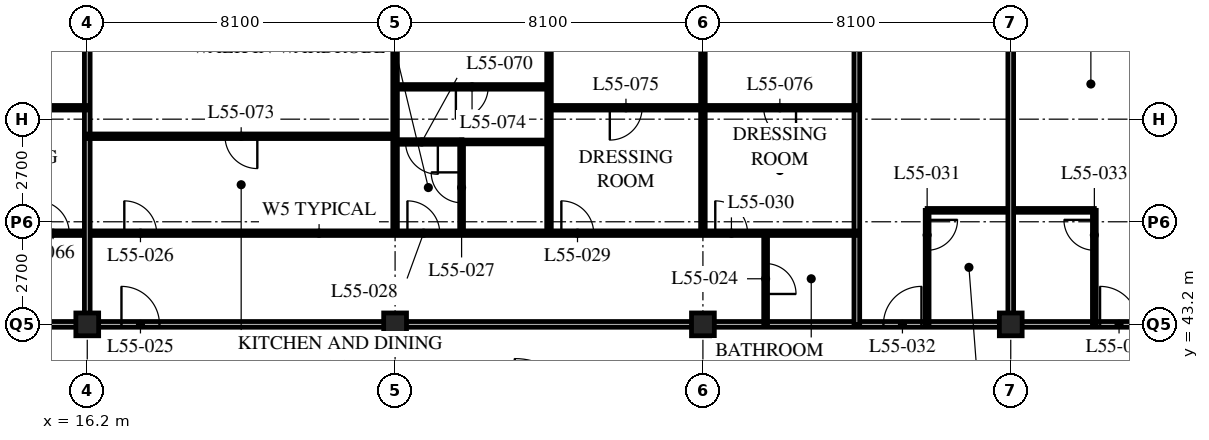
"""IFC4 building model, lengths in metres.
Left out: names, types, materials, properties, quantities, classifications, styles, units other than length and angle.
Written with IfcOpenShell. Run it as: python <this file> out.ifc"""

import sys

from ifc_helpers import new_model, si_unit, direction, frame, frame_2d, origin, origin_2d, place, context, subcontext, project, spatial, rectangle, hollow_rectangle, extrude, element, fill, save


model = new_model("IFC4")
c1 = context("Model", 3, precision=1e-05, world=origin(), true_north=direction((0.0, 1.0)))
c2 = subcontext(c1, "Body", "Model", "MODEL_VIEW")
j1 = project(units=[si_unit("LENGTHUNIT", "METRE"), si_unit("PLANEANGLEUNIT", "RADIAN")], contexts=[c1])
p1 = place(None, origin())
s1 = spatial("IfcSite", under=j1, at=p1, CompositionType="ELEMENT")
p2 = place(p1, origin())
s2 = spatial("IfcBuilding", under=s1, at=p2, CompositionType="ELEMENT")
p3 = place(p2, frame((0.0, 0.0, 213.6)))
s3 = spatial("IfcBuildingStorey", under=s2, at=p3, CompositionType="ELEMENT", Elevation=213.6)
for number, where, z_axis, x_axis in (
    (1, (16.2, 43.2, 0.0), (0.0, 0.0, 1.0), (1.0, 0.0, 0.0)),
    (2, (24.3, 43.2, 0.0), (0.0, 0.0, 1.0), (1.0, 0.0, 0.0)),
    (3, (32.4, 43.2, 0.0), (0.0, 0.0, 1.0), (1.0, 0.0, 0.0)),
    (4, (40.5, 43.2, 0.0), (0.0, 0.0, 1.0), (1.0, 0.0, 0.0)),
):
    element("IfcColumn", number, at=place(p3, frame(where, z_axis=z_axis, x_axis=x_axis)), inside=s3, PredefinedType="COLUMN", context=c2, shape_type="SweptSolid", body=[
        extrude(hollow_rectangle(XDim=0.6, YDim=0.6, WallThickness=0.05, at=origin_2d()), origin(), (0.0, 0.0, 1.0), 3.6),
    ])
p4 = place(p3, frame((12.15, 43.2, 0.0), z_axis=(0.0, 0.0, 1.0), x_axis=(1.0, 0.0, 0.0)))
e5 = element("IfcWall", 5, at=p4, inside=s3, PredefinedType="PARTITIONING", context=c2, shape_type="SweptSolid", body=[
    extrude(rectangle(XDim=36.45, YDim=0.15, at=frame_2d((18.225, 0.0))), origin(), (0.0, 0.0, 1.0), 2.778),
])
p5 = place(p4, frame((4.95, 0.0, 0.0)))
e6 = element("IfcOpeningElement", 6, at=p5, cuts=e5, PredefinedType="OPENING", context=c2, shape_type="SweptSolid", body=[
    extrude(rectangle(XDim=1.0, YDim=2.1, at=frame_2d((0.5, 1.05))), frame((0.0, 0.085, 0.0), z_axis=(0.0, -1.0, 0.0), x_axis=(1.0, 0.0, 0.0)), (0.0, 0.0, 1.0), 0.17),
])
p6 = place(p4, frame((25.0, 0.0, 0.0)))
e7 = element("IfcOpeningElement", 7, at=p6, cuts=e5, PredefinedType="OPENING", context=c2, shape_type="SweptSolid", body=[
    extrude(rectangle(XDim=1.0, YDim=2.1, at=frame_2d((0.5, 1.05))), frame((0.0, 0.085, 0.0), z_axis=(0.0, -1.0, 0.0), x_axis=(1.0, 0.0, 0.0)), (0.0, 0.0, 1.0), 0.17),
])
p7 = place(p4, frame((30.7, 0.0, 0.0)))
e8 = element("IfcOpeningElement", 8, at=p7, cuts=e5, PredefinedType="OPENING", context=c2, shape_type="SweptSolid", body=[
    extrude(rectangle(XDim=1.0, YDim=2.1, at=frame_2d((0.5, 1.05))), frame((0.0, 0.085, 0.0), z_axis=(0.0, -1.0, 0.0), x_axis=(1.0, 0.0, 0.0)), (0.0, 0.0, 1.0), 0.17),
])
p8 = place(p4, frame((33.925, 0.0, 0.0)))
e9 = element("IfcOpeningElement", 9, at=p8, cuts=e5, PredefinedType="OPENING", context=c2, shape_type="SweptSolid", body=[
    extrude(rectangle(XDim=1.0, YDim=2.1, at=frame_2d((0.5, 1.05))), frame((0.0, 0.085, 0.0), z_axis=(0.0, -1.0, 0.0), x_axis=(1.0, 0.0, 0.0)), (0.0, 0.0, 1.0), 0.17),
])
p9 = place(p4, frame((1.525, 0.0, 0.0)))
e10 = element("IfcOpeningElement", 10, at=p9, cuts=e5, PredefinedType="OPENING", context=c2, shape_type="SweptSolid", body=[
    extrude(rectangle(XDim=1.0, YDim=2.1, at=frame_2d((0.5, 1.05))), frame((0.0, 0.085, 0.0), z_axis=(0.0, -1.0, 0.0), x_axis=(1.0, 0.0, 0.0)), (0.0, 0.0, 1.0), 0.17),
])
p10 = place(p3, frame((34.05, 43.2, 0.0), z_axis=(0.0, 0.0, 1.0), x_axis=(0.0, 1.0, 0.0)))
e11 = element("IfcWall", 11, at=p10, inside=s3, PredefinedType="PARTITIONING", context=c2, shape_type="SweptSolid", body=[
    extrude(rectangle(XDim=2.4, YDim=0.1, at=frame_2d((1.2, 0.0))), origin(), (0.0, 0.0, 1.0), 3.39),
])
p11 = place(p10, frame((0.8, 0.0, 0.0)))
e12 = element("IfcOpeningElement", 12, at=p11, cuts=e11, PredefinedType="OPENING", context=c2, shape_type="SweptSolid", body=[
    extrude(rectangle(XDim=0.8, YDim=2.1, at=frame_2d((0.4, 1.05))), frame((0.0, 0.06, 0.0), z_axis=(0.0, -1.0, 0.0), x_axis=(1.0, 0.0, 0.0)), (0.0, 0.0, 1.0), 0.12),
])
p12 = place(p3, frame((26.05, 45.6, 0.0), z_axis=(0.0, 0.0, 1.0), x_axis=(0.0, 1.0, 0.0)))
e13 = element("IfcWall", 13, at=p12, inside=s3, PredefinedType="PARTITIONING", context=c2, shape_type="SweptSolid", body=[
    extrude(rectangle(XDim=2.4, YDim=0.1, at=frame_2d((1.2, 0.0))), origin(), (0.0, 0.0, 1.0), 3.39),
])
p13 = place(p12, frame((0.8, 0.0, 0.0)))
e14 = element("IfcOpeningElement", 14, at=p13, cuts=e13, PredefinedType="OPENING", context=c2, shape_type="SweptSolid", body=[
    extrude(rectangle(XDim=0.8, YDim=2.1, at=frame_2d((0.4, 1.05))), frame((0.0, 0.06, 0.0), z_axis=(0.0, -1.0, 0.0), x_axis=(1.0, 0.0, 0.0)), (0.0, 0.0, 1.0), 0.12),
])
p14 = place(p3, frame((26.05, 48.0, 0.0), z_axis=(0.0, 0.0, 1.0), x_axis=(1.0, 0.0, 0.0)))
e15 = element("IfcWall", 15, at=p14, inside=s3, PredefinedType="PARTITIONING", context=c2, shape_type="SweptSolid", body=[
    extrude(rectangle(XDim=2.3, YDim=0.1, at=frame_2d((1.15, 0.0))), origin(), (0.0, 0.0, 1.0), 3.39),
])
p15 = place(p3, frame((24.3, 45.6, 0.0), z_axis=(0.0, 0.0, 1.0), x_axis=(0.0, 1.0, 0.0)))
e16 = element("IfcWall", 16, at=p15, inside=s3, PredefinedType="PARTITIONING", context=c2, shape_type="SweptSolid", body=[
    extrude(rectangle(XDim=13.5, YDim=0.12, at=frame_2d((6.75, 0.0))), origin(), (0.0, 0.0, 1.0), 2.778),
])
p16 = place(p3, frame((28.35, 45.6, 0.0), z_axis=(0.0, 0.0, 1.0), x_axis=(0.0, 1.0, 0.0)))
e17 = element("IfcWall", 17, at=p16, inside=s3, PredefinedType="PARTITIONING", context=c2, shape_type="SweptSolid", body=[
    extrude(rectangle(XDim=13.5, YDim=0.12, at=frame_2d((6.75, 0.0))), origin(), (0.0, 0.0, 1.0), 3.39),
])
p17 = place(p3, frame((32.4, 45.6, 0.0), z_axis=(0.0, 0.0, 1.0), x_axis=(0.0, 1.0, 0.0)))
e18 = element("IfcWall", 18, at=p17, inside=s3, PredefinedType="PARTITIONING", context=c2, shape_type="SweptSolid", body=[
    extrude(rectangle(XDim=13.5, YDim=0.12, at=frame_2d((6.75, 0.0))), origin(), (0.0, 0.0, 1.0), 2.778),
])
p18 = place(p3, frame((36.45, 43.2, 0.0), z_axis=(0.0, 0.0, 1.0), x_axis=(0.0, 1.0, 0.0)))
e19 = element("IfcWall", 19, at=p18, inside=s3, PredefinedType="PARTITIONING", context=c2, shape_type="SweptSolid", body=[
    extrude(rectangle(XDim=15.9, YDim=0.15, at=frame_2d((7.95, 0.0))), origin(), (0.0, 0.0, 1.0), 3.39),
])
p19 = place(p3, frame((38.3, 46.2, 0.0), z_axis=(0.0, 0.0, 1.0), x_axis=(1.0, 0.0, 0.0)))
e20 = element("IfcWall", 20, at=p19, inside=s3, PredefinedType="PARTITIONING", context=c2, shape_type="SweptSolid", body=[
    extrude(rectangle(XDim=4.4, YDim=0.1, at=frame_2d((2.2, 0.0))), origin(), (0.0, 0.0, 1.0), 3.39),
])
p20 = place(p3, frame((38.3, 43.2, 0.0), z_axis=(0.0, 0.0, 1.0), x_axis=(0.0, 1.0, 0.0)))
e21 = element("IfcWall", 21, at=p20, inside=s3, PredefinedType="PARTITIONING", context=c2, shape_type="SweptSolid", body=[
    extrude(rectangle(XDim=3.0, YDim=0.1, at=frame_2d((1.5, 0.0))), origin(), (0.0, 0.0, 1.0), 3.39),
])
p21 = place(p20, frame((1.95, 0.0, 0.0)))
e22 = element("IfcOpeningElement", 22, at=p21, cuts=e21, PredefinedType="OPENING", context=c2, shape_type="SweptSolid", body=[
    extrude(rectangle(XDim=0.8, YDim=2.1, at=frame_2d((0.4, 1.05))), frame((0.0, 0.06, 0.0), z_axis=(0.0, -1.0, 0.0), x_axis=(1.0, 0.0, 0.0)), (0.0, 0.0, 1.0), 0.12),
])
p22 = place(p3, frame((40.5, 43.2, 0.0), z_axis=(0.0, 0.0, 1.0), x_axis=(0.0, 1.0, 0.0)))
e23 = element("IfcWall", 23, at=p22, inside=s3, PredefinedType="PARTITIONING", context=c2, shape_type="SweptSolid", body=[
    extrude(rectangle(XDim=15.9, YDim=0.15, at=frame_2d((7.95, 0.0))), origin(), (0.0, 0.0, 1.0), 2.778),
])
p23 = place(p3, frame((42.7, 43.2, 0.0), z_axis=(0.0, 0.0, 1.0), x_axis=(0.0, 1.0, 0.0)))
e24 = element("IfcWall", 24, at=p23, inside=s3, PredefinedType="PARTITIONING", context=c2, shape_type="SweptSolid", body=[
    extrude(rectangle(XDim=3.0, YDim=0.1, at=frame_2d((1.5, 0.0))), origin(), (0.0, 0.0, 1.0), 3.39),
])
p24 = place(p23, frame((1.95, 0.0, 0.0)))
e25 = element("IfcOpeningElement", 25, at=p24, cuts=e24, PredefinedType="OPENING", context=c2, shape_type="SweptSolid", body=[
    extrude(rectangle(XDim=0.8, YDim=2.1, at=frame_2d((0.4, 1.05))), frame((0.0, 0.06, 0.0), z_axis=(0.0, -1.0, 0.0), x_axis=(1.0, 0.0, 0.0)), (0.0, 0.0, 1.0), 0.12),
])
p25 = place(p3, frame((8.15, 45.6, 0.0), z_axis=(0.0, 0.0, 1.0), x_axis=(1.0, 0.0, 0.0)))
e26 = element("IfcWall", 26, at=p25, inside=s3, PredefinedType="PARTITIONING", context=c2, shape_type="SweptSolid", body=[
    extrude(rectangle(XDim=28.3, YDim=0.12, at=frame_2d((14.15, 0.0))), origin(), (0.0, 0.0, 1.0), 3.39),
])
p26 = place(p25, frame((9.025, 0.0, 0.0)))
e27 = element("IfcOpeningElement", 27, at=p26, cuts=e26, PredefinedType="OPENING", context=c2, shape_type="SweptSolid", body=[
    extrude(rectangle(XDim=0.85, YDim=2.1, at=frame_2d((0.425, 1.05))), frame((0.0, 0.07, 0.0), z_axis=(0.0, -1.0, 0.0), x_axis=(1.0, 0.0, 0.0)), (0.0, 0.0, 1.0), 0.14),
])
p27 = place(p25, frame((16.475, 0.0, 0.0)))
e28 = element("IfcOpeningElement", 28, at=p27, cuts=e26, PredefinedType="OPENING", context=c2, shape_type="SweptSolid", body=[
    extrude(rectangle(XDim=0.85, YDim=2.1, at=frame_2d((0.425, 1.05))), frame((0.0, 0.07, 0.0), z_axis=(0.0, -1.0, 0.0), x_axis=(1.0, 0.0, 0.0)), (0.0, 0.0, 1.0), 0.14),
])
p28 = place(p25, frame((20.525, 0.0, 0.0)))
e29 = element("IfcOpeningElement", 29, at=p28, cuts=e26, PredefinedType="OPENING", context=c2, shape_type="SweptSolid", body=[
    extrude(rectangle(XDim=0.85, YDim=2.1, at=frame_2d((0.425, 1.05))), frame((0.0, 0.07, 0.0), z_axis=(0.0, -1.0, 0.0), x_axis=(1.0, 0.0, 0.0)), (0.0, 0.0, 1.0), 0.14),
])
p29 = place(p25, frame((24.575, 0.0, 0.0)))
e30 = element("IfcOpeningElement", 30, at=p29, cuts=e26, PredefinedType="OPENING", context=c2, shape_type="SweptSolid", body=[
    extrude(rectangle(XDim=0.85, YDim=2.1, at=frame_2d((0.425, 1.05))), frame((0.0, 0.07, 0.0), z_axis=(0.0, -1.0, 0.0), x_axis=(1.0, 0.0, 0.0)), (0.0, 0.0, 1.0), 0.14),
])
p30 = place(p25, frame((6.725, 0.0, 0.0)))
e31 = element("IfcOpeningElement", 31, at=p30, cuts=e26, PredefinedType="OPENING", context=c2, shape_type="SweptSolid", body=[
    extrude(rectangle(XDim=0.85, YDim=2.1, at=frame_2d((0.425, 1.05))), frame((0.0, 0.07, 0.0), z_axis=(0.0, -1.0, 0.0), x_axis=(1.0, 0.0, 0.0)), (0.0, 0.0, 1.0), 0.14),
])
p31 = place(p25, frame((2.875, 0.0, 0.0)))
e32 = element("IfcOpeningElement", 32, at=p31, cuts=e26, PredefinedType="OPENING", context=c2, shape_type="SweptSolid", body=[
    extrude(rectangle(XDim=0.85, YDim=2.1, at=frame_2d((0.425, 1.05))), frame((0.0, 0.07, 0.0), z_axis=(0.0, -1.0, 0.0), x_axis=(1.0, 0.0, 0.0)), (0.0, 0.0, 1.0), 0.14),
])
p32 = place(p3, frame((16.2, 43.2, 0.0), z_axis=(0.0, 0.0, 1.0), x_axis=(0.0, 1.0, 0.0)))
e33 = element("IfcWall", 33, at=p32, inside=s3, PredefinedType="PARTITIONING", context=c2, shape_type="SweptSolid", body=[
    extrude(rectangle(XDim=15.9, YDim=0.15, at=frame_2d((7.95, 0.0))), origin(), (0.0, 0.0, 1.0), 2.778),
])
p33 = place(p3, frame((24.3, 48.0, 0.0), z_axis=(0.0, 0.0, 1.0), x_axis=(1.0, 0.0, 0.0)))
e34 = element("IfcWall", 34, at=p33, inside=s3, PredefinedType="PARTITIONING", context=c2, shape_type="SweptSolid", body=[
    extrude(rectangle(XDim=1.76, YDim=0.12, at=frame_2d((0.88, 0.0))), origin(), (0.0, 0.0, 1.0), 3.39),
])
p34 = place(p33, frame((0.275, 0.0, 0.0)))
e35 = element("IfcOpeningElement", 35, at=p34, cuts=e34, PredefinedType="OPENING", context=c2, shape_type="SweptSolid", body=[
    extrude(rectangle(XDim=0.85, YDim=2.1, at=frame_2d((0.425, 1.05))), frame((0.0, 0.07, 0.0), z_axis=(0.0, -1.0, 0.0), x_axis=(1.0, 0.0, 0.0)), (0.0, 0.0, 1.0), 0.14),
])
p35 = place(p3, frame((16.2, 48.15, 0.0), z_axis=(0.0, 0.0, 1.0), x_axis=(1.0, 0.0, 0.0)))
e36 = element("IfcWall", 36, at=p35, inside=s3, PredefinedType="PARTITIONING", context=c2, shape_type="SweptSolid", body=[
    extrude(rectangle(XDim=8.1, YDim=0.12, at=frame_2d((4.05, 0.0))), origin(), (0.0, 0.0, 1.0), 3.39),
])
p36 = place(p35, frame((3.625, 0.0, 0.0)))
e37 = element("IfcOpeningElement", 37, at=p36, cuts=e36, PredefinedType="OPENING", context=c2, shape_type="SweptSolid", body=[
    extrude(rectangle(XDim=0.85, YDim=2.1, at=frame_2d((0.425, 1.05))), frame((0.0, 0.07, 0.0), z_axis=(0.0, -1.0, 0.0), x_axis=(1.0, 0.0, 0.0)), (0.0, 0.0, 1.0), 0.14),
])
p37 = place(p3, frame((24.3, 49.45, 0.0), z_axis=(0.0, 0.0, 1.0), x_axis=(1.0, 0.0, 0.0)))
e38 = element("IfcWall", 38, at=p37, inside=s3, PredefinedType="PARTITIONING", context=c2, shape_type="SweptSolid", body=[
    extrude(rectangle(XDim=4.05, YDim=0.12, at=frame_2d((2.025, 0.0))), origin(), (0.0, 0.0, 1.0), 3.39),
])
p38 = place(p37, frame((1.6, 0.0, 0.0)))
e39 = element("IfcOpeningElement", 39, at=p38, cuts=e38, PredefinedType="OPENING", context=c2, shape_type="SweptSolid", body=[
    extrude(rectangle(XDim=0.85, YDim=2.1, at=frame_2d((0.425, 1.05))), frame((0.0, 0.07, 0.0), z_axis=(0.0, -1.0, 0.0), x_axis=(1.0, 0.0, 0.0)), (0.0, 0.0, 1.0), 0.14),
])
p39 = place(p3, frame((28.35, 48.9, 0.0), z_axis=(0.0, 0.0, 1.0), x_axis=(1.0, 0.0, 0.0)))
e40 = element("IfcWall", 40, at=p39, inside=s3, PredefinedType="PARTITIONING", context=c2, shape_type="SweptSolid", body=[
    extrude(rectangle(XDim=8.1, YDim=0.12, at=frame_2d((4.05, 0.0))), origin(), (0.0, 0.0, 1.0), 3.39),
])
p40 = place(p39, frame((1.6, 0.0, 0.0)))
e41 = element("IfcOpeningElement", 41, at=p40, cuts=e40, PredefinedType="OPENING", context=c2, shape_type="SweptSolid", body=[
    extrude(rectangle(XDim=0.85, YDim=2.1, at=frame_2d((0.425, 1.05))), frame((0.0, 0.07, 0.0), z_axis=(0.0, -1.0, 0.0), x_axis=(1.0, 0.0, 0.0)), (0.0, 0.0, 1.0), 0.14),
])
p41 = place(p39, frame((5.65, 0.0, 0.0)))
e42 = element("IfcOpeningElement", 42, at=p41, cuts=e40, PredefinedType="OPENING", context=c2, shape_type="SweptSolid", body=[
    extrude(rectangle(XDim=0.85, YDim=2.1, at=frame_2d((0.425, 1.05))), frame((0.0, 0.07, 0.0), z_axis=(0.0, -1.0, 0.0), x_axis=(1.0, 0.0, 0.0)), (0.0, 0.0, 1.0), 0.14),
])
p42 = place(p3, frame((12.15, 48.9, 0.0), z_axis=(0.0, 0.0, 1.0), x_axis=(1.0, 0.0, 0.0)))
e43 = element("IfcWall", 43, at=p42, inside=s3, PredefinedType="PARTITIONING", context=c2, shape_type="SweptSolid", body=[
    extrude(rectangle(XDim=4.05, YDim=0.12, at=frame_2d((2.025, 0.0))), origin(), (0.0, 0.0, 1.0), 3.39),
])
p43 = place(p42, frame((1.6, 0.0, 0.0)))
e44 = element("IfcOpeningElement", 44, at=p43, cuts=e43, PredefinedType="OPENING", context=c2, shape_type="SweptSolid", body=[
    extrude(rectangle(XDim=0.85, YDim=2.1, at=frame_2d((0.425, 1.05))), frame((0.0, 0.07, 0.0), z_axis=(0.0, -1.0, 0.0), x_axis=(1.0, 0.0, 0.0)), (0.0, 0.0, 1.0), 0.14),
])
p44 = place(p11, origin())
e45 = element("IfcDoor", 45, at=p44, inside=s3, OperationType="SINGLE_SWING_RIGHT", PredefinedType="DOOR", context=c2, shape_type="SweptSolid", body=[
    extrude(rectangle(XDim=0.8, YDim=2.1, at=frame_2d((0.4, 1.05))), frame((0.0, 0.025, 0.0), z_axis=(0.0, -1.0, 0.0), x_axis=(1.0, 0.0, 0.0)), (0.0, 0.0, 1.0), 0.05),
])
fill(e12, e45)
p45 = place(p5, origin())
e46 = element("IfcDoor", 46, at=p45, inside=s3, OperationType="SINGLE_SWING_LEFT", PredefinedType="DOOR", context=c2, shape_type="SweptSolid", body=[
    extrude(rectangle(XDim=1.0, YDim=2.1, at=frame_2d((0.5, 1.05))), frame((0.0, 0.025, 0.0), z_axis=(0.0, -1.0, 0.0), x_axis=(1.0, 0.0, 0.0)), (0.0, 0.0, 1.0), 0.05),
])
fill(e6, e46)
p46 = place(p26, origin())
e47 = element("IfcDoor", 47, at=p46, inside=s3, OperationType="SINGLE_SWING_LEFT", PredefinedType="DOOR", context=c2, shape_type="SweptSolid", body=[
    extrude(rectangle(XDim=0.85, YDim=2.1, at=frame_2d((0.425, 1.05))), frame((0.0, 0.025, 0.0), z_axis=(0.0, -1.0, 0.0), x_axis=(1.0, 0.0, 0.0)), (0.0, 0.0, 1.0), 0.05),
])
fill(e27, e47)
p47 = place(p13, origin())
e48 = element("IfcDoor", 48, at=p47, inside=s3, OperationType="SINGLE_SWING_RIGHT", PredefinedType="DOOR", context=c2, shape_type="SweptSolid", body=[
    extrude(rectangle(XDim=0.8, YDim=2.1, at=frame_2d((0.4, 1.05))), frame((0.0, 0.025, 0.0), z_axis=(0.0, -1.0, 0.0), x_axis=(1.0, 0.0, 0.0)), (0.0, 0.0, 1.0), 0.05),
])
fill(e14, e48)
p48 = place(p27, origin())
e49 = element("IfcDoor", 49, at=p48, inside=s3, OperationType="SINGLE_SWING_LEFT", PredefinedType="DOOR", context=c2, shape_type="SweptSolid", body=[
    extrude(rectangle(XDim=0.85, YDim=2.1, at=frame_2d((0.425, 1.05))), frame((0.0, 0.025, 0.0), z_axis=(0.0, -1.0, 0.0), x_axis=(1.0, 0.0, 0.0)), (0.0, 0.0, 1.0), 0.05),
])
fill(e28, e49)
p49 = place(p28, origin())
e50 = element("IfcDoor", 50, at=p49, inside=s3, OperationType="SINGLE_SWING_LEFT", PredefinedType="DOOR", context=c2, shape_type="SweptSolid", body=[
    extrude(rectangle(XDim=0.85, YDim=2.1, at=frame_2d((0.425, 1.05))), frame((0.0, 0.025, 0.0), z_axis=(0.0, -1.0, 0.0), x_axis=(1.0, 0.0, 0.0)), (0.0, 0.0, 1.0), 0.05),
])
fill(e29, e50)
p50 = place(p29, origin())
e51 = element("IfcDoor", 51, at=p50, inside=s3, OperationType="SINGLE_SWING_LEFT", PredefinedType="DOOR", context=c2, shape_type="SweptSolid", body=[
    extrude(rectangle(XDim=0.85, YDim=2.1, at=frame_2d((0.425, 1.05))), frame((0.0, 0.025, 0.0), z_axis=(0.0, -1.0, 0.0), x_axis=(1.0, 0.0, 0.0)), (0.0, 0.0, 1.0), 0.05),
])
fill(e30, e51)
p51 = place(p21, origin())
e52 = element("IfcDoor", 52, at=p51, inside=s3, OperationType="SINGLE_SWING_LEFT", PredefinedType="DOOR", context=c2, shape_type="SweptSolid", body=[
    extrude(rectangle(XDim=0.8, YDim=2.1, at=frame_2d((0.4, 1.05))), frame((0.0, 0.025, 0.0), z_axis=(0.0, -1.0, 0.0), x_axis=(1.0, 0.0, 0.0)), (0.0, 0.0, 1.0), 0.05),
])
fill(e22, e52)
p52 = place(p6, origin())
e53 = element("IfcDoor", 53, at=p52, inside=s3, OperationType="SINGLE_SWING_RIGHT", PredefinedType="DOOR", context=c2, shape_type="SweptSolid", body=[
    extrude(rectangle(XDim=1.0, YDim=2.1, at=frame_2d((0.5, 1.05))), frame((0.0, 0.025, 0.0), z_axis=(0.0, -1.0, 0.0), x_axis=(1.0, 0.0, 0.0)), (0.0, 0.0, 1.0), 0.05),
])
fill(e7, e53)
p53 = place(p24, origin())
e54 = element("IfcDoor", 54, at=p53, inside=s3, OperationType="SINGLE_SWING_RIGHT", PredefinedType="DOOR", context=c2, shape_type="SweptSolid", body=[
    extrude(rectangle(XDim=0.8, YDim=2.1, at=frame_2d((0.4, 1.05))), frame((0.0, 0.025, 0.0), z_axis=(0.0, -1.0, 0.0), x_axis=(1.0, 0.0, 0.0)), (0.0, 0.0, 1.0), 0.05),
])
fill(e25, e54)
p54 = place(p7, origin())
e55 = element("IfcDoor", 55, at=p54, inside=s3, OperationType="SINGLE_SWING_LEFT", PredefinedType="DOOR", context=c2, shape_type="SweptSolid", body=[
    extrude(rectangle(XDim=1.0, YDim=2.1, at=frame_2d((0.5, 1.05))), frame((0.0, 0.025, 0.0), z_axis=(0.0, -1.0, 0.0), x_axis=(1.0, 0.0, 0.0)), (0.0, 0.0, 1.0), 0.05),
])
fill(e8, e55)
p55 = place(p30, origin())
e56 = element("IfcDoor", 56, at=p55, inside=s3, OperationType="SINGLE_SWING_LEFT", PredefinedType="DOOR", context=c2, shape_type="SweptSolid", body=[
    extrude(rectangle(XDim=0.85, YDim=2.1, at=frame_2d((0.425, 1.05))), frame((0.0, 0.025, 0.0), z_axis=(0.0, -1.0, 0.0), x_axis=(1.0, 0.0, 0.0)), (0.0, 0.0, 1.0), 0.05),
])
fill(e31, e56)
p56 = place(p34, origin())
e57 = element("IfcDoor", 57, at=p56, inside=s3, OperationType="SINGLE_SWING_LEFT", PredefinedType="DOOR", context=c2, shape_type="SweptSolid", body=[
    extrude(rectangle(XDim=0.85, YDim=2.1, at=frame_2d((0.425, 1.05))), frame((0.0, 0.025, 0.0), z_axis=(0.0, -1.0, 0.0), x_axis=(1.0, 0.0, 0.0)), (0.0, 0.0, 1.0), 0.05),
])
fill(e35, e57)
p57 = place(p36, origin())
e58 = element("IfcDoor", 58, at=p57, inside=s3, OperationType="SINGLE_SWING_LEFT", PredefinedType="DOOR", context=c2, shape_type="SweptSolid", body=[
    extrude(rectangle(XDim=0.85, YDim=2.1, at=frame_2d((0.425, 1.05))), frame((0.0, 0.025, 0.0), z_axis=(0.0, -1.0, 0.0), x_axis=(1.0, 0.0, 0.0)), (0.0, 0.0, 1.0), 0.05),
])
fill(e37, e58)
p58 = place(p38, origin())
e59 = element("IfcDoor", 59, at=p58, inside=s3, OperationType="SINGLE_SWING_RIGHT", PredefinedType="DOOR", context=c2, shape_type="SweptSolid", body=[
    extrude(rectangle(XDim=0.85, YDim=2.1, at=frame_2d((0.425, 1.05))), frame((0.0, 0.025, 0.0), z_axis=(0.0, -1.0, 0.0), x_axis=(1.0, 0.0, 0.0)), (0.0, 0.0, 1.0), 0.05),
])
fill(e39, e59)
p59 = place(p40, origin())
e60 = element("IfcDoor", 60, at=p59, inside=s3, OperationType="SINGLE_SWING_RIGHT", PredefinedType="DOOR", context=c2, shape_type="SweptSolid", body=[
    extrude(rectangle(XDim=0.85, YDim=2.1, at=frame_2d((0.425, 1.05))), frame((0.0, 0.025, 0.0), z_axis=(0.0, -1.0, 0.0), x_axis=(1.0, 0.0, 0.0)), (0.0, 0.0, 1.0), 0.05),
])
fill(e41, e60)
p60 = place(p41, origin())
e61 = element("IfcDoor", 61, at=p60, inside=s3, OperationType="SINGLE_SWING_LEFT", PredefinedType="DOOR", context=c2, shape_type="SweptSolid", body=[
    extrude(rectangle(XDim=0.85, YDim=2.1, at=frame_2d((0.425, 1.05))), frame((0.0, 0.025, 0.0), z_axis=(0.0, -1.0, 0.0), x_axis=(1.0, 0.0, 0.0)), (0.0, 0.0, 1.0), 0.05),
])
fill(e42, e61)
save(model, sys.argv[1])
